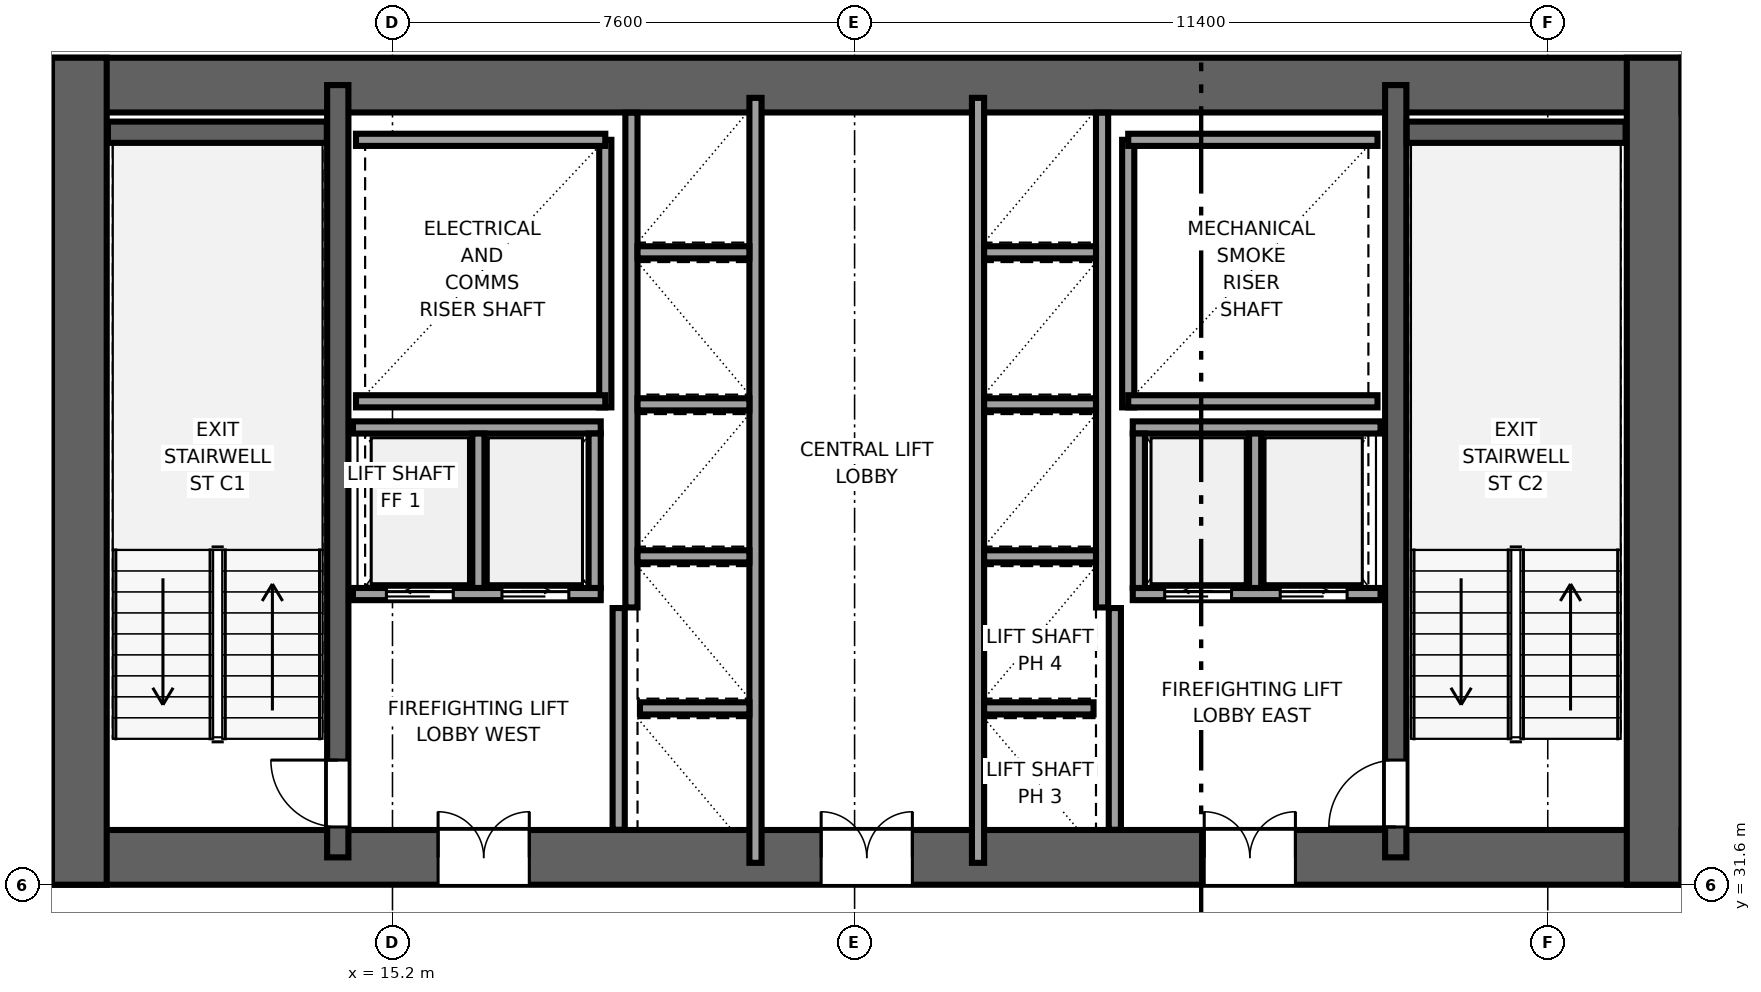
"""IFC4 building model, lengths in metres.
Left out: names, types, materials, properties, quantities, classifications, styles, units other than length and angle.
Written with IfcOpenShell. Run it as: python <this file> out.ifc"""

import sys

from ifc_helpers import new_model, si_unit, direction, frame, frame_2d, origin, place, context, subcontext, project, spatial, rectangle, extrude, source, transform, mapped, element, fill, save


model = new_model("IFC4")
c1 = context("Model", 3, precision=1e-05, world=origin(), true_north=direction((0.0, 1.0)))
c2 = subcontext(c1, "Body", "Model", "MODEL_VIEW")
j1 = project(units=[si_unit("LENGTHUNIT", "METRE"), si_unit("PLANEANGLEUNIT", "RADIAN")], contexts=[c1])
p1 = place(None, origin())
s1 = spatial("IfcSite", under=j1, at=p1, CompositionType="ELEMENT")
p2 = place(p1, origin())
s2 = spatial("IfcBuilding", under=s1, at=p2, CompositionType="ELEMENT")
p3 = place(p2, frame((0.0, 0.0, 63.95)))
s3 = spatial("IfcBuildingStorey", under=s2, at=p3, CompositionType="ELEMENT", Elevation=63.95)
p4 = place(p3, frame((9.6, 32.05, 0.0), z_axis=(0.0, 0.0, 1.0), x_axis=(1.0, 0.0, 0.0)))
e1 = element("IfcWall", 1, at=p4, inside=s3, PredefinedType="SHEAR", context=c2, shape_type="SweptSolid", body=[
    extrude(rectangle(XDim=26.8, YDim=0.9, at=frame_2d((13.4, 0.0))), origin(), (0.0, 0.0, 1.0), 3.55),
])
p5 = place(p4, frame((7.85, 0.0, 0.0), z_axis=(0.0, 0.0, 1.0), x_axis=(-1.0, 0.0, 0.0)))
e2 = element("IfcOpeningElement", 2, at=p5, cuts=e1, PredefinedType="OPENING", context=c2, shape_type="SweptSolid", body=[
    extrude(rectangle(XDim=1.5, YDim=2.04, at=frame_2d((0.75, 1.02))), frame((0.0, 0.46, 0.0), z_axis=(0.0, -1.0, 0.0), x_axis=(1.0, 0.0, 0.0)), (0.0, 0.0, 1.0), 0.92),
])
p6 = place(p4, frame((14.15, 0.0, 0.0), z_axis=(0.0, 0.0, 1.0), x_axis=(-1.0, 0.0, 0.0)))
e3 = element("IfcOpeningElement", 3, at=p6, cuts=e1, PredefinedType="OPENING", context=c2, shape_type="SweptSolid", body=[
    extrude(rectangle(XDim=1.5, YDim=2.04, at=frame_2d((0.75, 1.02))), frame((0.0, 0.46, 0.0), z_axis=(0.0, -1.0, 0.0), x_axis=(1.0, 0.0, 0.0)), (0.0, 0.0, 1.0), 0.92),
])
p7 = place(p4, frame((20.45, 0.0, 0.0), z_axis=(0.0, 0.0, 1.0), x_axis=(-1.0, 0.0, 0.0)))
e4 = element("IfcOpeningElement", 4, at=p7, cuts=e1, PredefinedType="OPENING", context=c2, shape_type="SweptSolid", body=[
    extrude(rectangle(XDim=1.5, YDim=2.04, at=frame_2d((0.75, 1.02))), frame((0.0, 0.46, 0.0), z_axis=(0.0, -1.0, 0.0), x_axis=(1.0, 0.0, 0.0)), (0.0, 0.0, 1.0), 0.92),
])
p8 = place(p3, frame((9.6, 44.75, 0.0), z_axis=(0.0, 0.0, 1.0), x_axis=(1.0, 0.0, 0.0)))
e5 = element("IfcWall", 5, at=p8, inside=s3, PredefinedType="SHEAR", context=c2, shape_type="SweptSolid", body=[
    extrude(rectangle(XDim=26.8, YDim=0.9, at=frame_2d((13.4, 0.0))), origin(), (0.0, 0.0, 1.0), 3.55),
])
for number, where, z_axis, x_axis in (
    (6, (10.05, 31.6, 0.0), (0.0, 0.0, 1.0), (0.0, 1.0, 0.0)),
    (7, (35.95, 31.6, 0.0), (0.0, 0.0, 1.0), (0.0, 1.0, 0.0)),
):
    element("IfcWall", number, at=place(p3, frame(where, z_axis=z_axis, x_axis=x_axis)), inside=s3, PredefinedType="SHEAR", context=c2, shape_type="SweptSolid", body=[
        extrude(rectangle(XDim=13.6, YDim=0.9, at=frame_2d((6.8, 0.0))), origin(), (0.0, 0.0, 1.0), 3.55),
    ])
p9 = place(p3, frame((14.3, 32.05, 0.0), z_axis=(0.0, 0.0, 1.0), x_axis=(0.0, 1.0, 0.0)))
e8 = element("IfcWall", 8, at=p9, inside=s3, PredefinedType="SHEAR", context=c2, shape_type="SweptSolid", body=[
    extrude(rectangle(XDim=12.7, YDim=0.35, at=frame_2d((6.35, 0.0))), origin(), (0.0, 0.0, 1.0), 3.55),
])
p10 = place(p9, frame((0.5, 0.0, 0.0)))
e9 = element("IfcOpeningElement", 9, at=p10, cuts=e8, PredefinedType="OPENING", context=c2, shape_type="SweptSolid", body=[
    extrude(rectangle(XDim=1.1, YDim=2.12, at=frame_2d((0.55, 1.06))), frame((0.0, 0.185, 0.0), z_axis=(0.0, -1.0, 0.0), x_axis=(1.0, 0.0, 0.0)), (0.0, 0.0, 1.0), 0.37),
])
p11 = place(p3, frame((31.7, 32.05, 0.0), z_axis=(0.0, 0.0, 1.0), x_axis=(0.0, 1.0, 0.0)))
e10 = element("IfcWall", 10, at=p11, inside=s3, PredefinedType="SHEAR", context=c2, shape_type="SweptSolid", body=[
    extrude(rectangle(XDim=12.7, YDim=0.35, at=frame_2d((6.35, 0.0))), origin(), (0.0, 0.0, 1.0), 3.55),
])
p12 = place(p11, frame((1.6, 0.0, 0.0), z_axis=(0.0, 0.0, 1.0), x_axis=(-1.0, 0.0, 0.0)))
e11 = element("IfcOpeningElement", 11, at=p12, cuts=e10, PredefinedType="OPENING", context=c2, shape_type="SweptSolid", body=[
    extrude(rectangle(XDim=1.1, YDim=2.12, at=frame_2d((0.55, 1.06))), frame((0.0, 0.185, 0.0), z_axis=(0.0, -1.0, 0.0), x_axis=(1.0, 0.0, 0.0)), (0.0, 0.0, 1.0), 0.37),
])
for number, where, z_axis, x_axis in (
    (12, (10.52, 43.975, 0.0), (0.0, 0.0, 1.0), (1.0, 0.0, 0.0)),
    (13, (31.88, 43.975, 0.0), (0.0, 0.0, 1.0), (1.0, 0.0, 0.0)),
):
    element("IfcWall", number, at=place(p3, frame(where, z_axis=z_axis, x_axis=x_axis)), inside=s3, PredefinedType="SHEAR", context=c2, shape_type="SweptSolid", body=[
        extrude(rectangle(XDim=3.6, YDim=0.35, at=frame_2d((1.8, 0.0))), origin(), (0.0, 0.0, 1.0), 3.55),
    ])
p13 = place(p3, frame((18.7, 39.45, 0.0), z_axis=(0.0, 0.0, 1.0), x_axis=(0.0, 1.0, 0.0)))
e14 = element("IfcWall", 14, at=p13, inside=s3, PredefinedType="SOLIDWALL", context=c2, shape_type="SweptSolid", body=[
    extrude(rectangle(XDim=4.4, YDim=0.2, at=frame_2d((2.2, 0.0))), origin(), (0.0, 0.0, 1.0), 3.37),
])
for number, where, z_axis, x_axis in (
    (15, (14.6, 39.55, 0.0), (0.0, 0.0, 1.0), (1.0, 0.0, 0.0)),
    (16, (14.6, 43.85, 0.0), (0.0, 0.0, 1.0), (1.0, 0.0, 0.0)),
):
    element("IfcWall", number, at=place(p3, frame(where, z_axis=z_axis, x_axis=x_axis)), inside=s3, PredefinedType="SOLIDWALL", context=c2, shape_type="SweptSolid", body=[
        extrude(rectangle(XDim=4.1, YDim=0.2, at=frame_2d((2.05, 0.0))), origin(), (0.0, 0.0, 1.0), 3.37),
    ])
p14 = place(p3, frame((27.3, 39.45, 0.0), z_axis=(0.0, 0.0, 1.0), x_axis=(0.0, 1.0, 0.0)))
e17 = element("IfcWall", 17, at=p14, inside=s3, PredefinedType="SOLIDWALL", context=c2, shape_type="SweptSolid", body=[
    extrude(rectangle(XDim=4.4, YDim=0.2, at=frame_2d((2.2, 0.0))), origin(), (0.0, 0.0, 1.0), 3.37),
])
for number, where, z_axis, x_axis in (
    (18, (27.3, 39.55, 0.0), (0.0, 0.0, 1.0), (1.0, 0.0, 0.0)),
    (19, (27.3, 43.85, 0.0), (0.0, 0.0, 1.0), (1.0, 0.0, 0.0)),
):
    element("IfcWall", number, at=place(p3, frame(where, z_axis=z_axis, x_axis=x_axis)), inside=s3, PredefinedType="SOLIDWALL", context=c2, shape_type="SweptSolid", body=[
        extrude(rectangle(XDim=4.1, YDim=0.2, at=frame_2d((2.05, 0.0))), origin(), (0.0, 0.0, 1.0), 3.37),
    ])
for number, where, z_axis, x_axis in (
    (20, (18.92, 32.504, 0.0), (0.0, 0.0, 1.0), (0.0, 1.0, 0.0)),
    (21, (27.08, 32.504, 0.0), (0.0, 0.0, 1.0), (0.0, 1.0, 0.0)),
):
    element("IfcWall", number, at=place(p3, frame(where, z_axis=z_axis, x_axis=x_axis)), inside=s3, PredefinedType="SOLIDWALL", context=c2, shape_type="SweptSolid", body=[
        extrude(rectangle(XDim=3.646, YDim=0.2, at=frame_2d((1.823, 0.0))), origin(), (0.0, 0.0, 1.0), 3.37),
    ])
p15 = place(p3, frame((21.17, 31.96, 0.0), z_axis=(0.0, 0.0, 1.0), x_axis=(0.0, 1.0, 0.0)))
e22 = element("IfcWall", 22, at=p15, inside=s3, PredefinedType="SOLIDWALL", context=c2, shape_type="SweptSolid", body=[
    extrude(rectangle(XDim=12.58, YDim=0.2, at=frame_2d((6.29, 0.0))), origin(), (0.0, 0.0, 1.0), 3.37),
])
p16 = place(p3, frame((19.13, 36.16, 0.0), z_axis=(0.0, 0.0, 1.0), x_axis=(0.0, 1.0, 0.0)))
e23 = element("IfcWall", 23, at=p16, inside=s3, PredefinedType="SOLIDWALL", context=c2, shape_type="SweptSolid", body=[
    extrude(rectangle(XDim=8.136, YDim=0.2, at=frame_2d((4.068, 0.0))), origin(), (0.0, 0.0, 1.0), 3.37),
])
p17 = place(p3, frame((19.27, 34.5, 0.0), z_axis=(0.0, 0.0, 1.0), x_axis=(1.0, 0.0, 0.0)))
e24 = element("IfcWall", 24, at=p17, inside=s3, PredefinedType="SOLIDWALL", context=c2, shape_type="SweptSolid", body=[
    extrude(rectangle(XDim=1.8, YDim=0.2, at=frame_2d((0.9, 0.0))), origin(), (0.0, 0.0, 1.0), 3.37),
])
for number, where, z_axis, x_axis in (
    (25, (19.23, 37.0, 0.0), (0.0, 0.0, 1.0), (1.0, 0.0, 0.0)),
    (26, (19.23, 39.5, 0.0), (0.0, 0.0, 1.0), (1.0, 0.0, 0.0)),
    (27, (19.23, 42.0, 0.0), (0.0, 0.0, 1.0), (1.0, 0.0, 0.0)),
):
    element("IfcWall", number, at=place(p3, frame(where, z_axis=z_axis, x_axis=x_axis)), inside=s3, PredefinedType="SOLIDWALL", context=c2, shape_type="SweptSolid", body=[
        extrude(rectangle(XDim=1.84, YDim=0.2, at=frame_2d((0.92, 0.0))), origin(), (0.0, 0.0, 1.0), 3.37),
    ])
p18 = place(p3, frame((27.375, 36.38, 0.0), z_axis=(0.0, 0.0, 1.0), x_axis=(1.0, 0.0, 0.0)))
e28 = element("IfcWall", 28, at=p18, inside=s3, PredefinedType="SOLIDWALL", context=c2, shape_type="SweptSolid", body=[
    extrude(rectangle(XDim=4.075, YDim=0.2, at=frame_2d((2.038, 0.0))), origin(), (0.0, 0.0, 1.0), 3.37),
])
p19 = place(p18, frame((0.525, 0.0, 0.0)))
e29 = element("IfcOpeningElement", 29, at=p19, cuts=e28, PredefinedType="OPENING", context=c2, shape_type="SweptSolid", body=[
    extrude(rectangle(XDim=1.1, YDim=2.12, at=frame_2d((0.55, 1.06))), frame((0.0, 0.11, 0.0), z_axis=(0.0, -1.0, 0.0), x_axis=(1.0, 0.0, 0.0)), (0.0, 0.0, 1.0), 0.22),
])
p20 = place(p18, frame((2.425, 0.0, 0.0)))
e30 = element("IfcOpeningElement", 30, at=p20, cuts=e28, PredefinedType="OPENING", context=c2, shape_type="SweptSolid", body=[
    extrude(rectangle(XDim=1.1, YDim=2.12, at=frame_2d((0.55, 1.06))), frame((0.0, 0.11, 0.0), z_axis=(0.0, -1.0, 0.0), x_axis=(1.0, 0.0, 0.0)), (0.0, 0.0, 1.0), 0.22),
])
p21 = place(p3, frame((27.375, 39.12, 0.0), z_axis=(0.0, 0.0, 1.0), x_axis=(1.0, 0.0, 0.0)))
e31 = element("IfcWall", 31, at=p21, inside=s3, PredefinedType="SOLIDWALL", context=c2, shape_type="SweptSolid", body=[
    extrude(rectangle(XDim=4.075, YDim=0.2, at=frame_2d((2.038, 0.0))), origin(), (0.0, 0.0, 1.0), 3.37),
])
for number, where, z_axis, x_axis in (
    (32, (27.475, 36.48, 0.0), (0.0, 0.0, 1.0), (0.0, 1.0, 0.0)),
    (33, (29.387, 36.48, 0.0), (0.0, 0.0, 1.0), (0.0, 1.0, 0.0)),
):
    element("IfcWall", number, at=place(p3, frame(where, z_axis=z_axis, x_axis=x_axis)), inside=s3, PredefinedType="SOLIDWALL", context=c2, shape_type="SweptSolid", body=[
        extrude(rectangle(XDim=2.54, YDim=0.2, at=frame_2d((1.27, 0.0))), origin(), (0.0, 0.0, 1.0), 3.37),
    ])
p22 = place(p3, frame((14.55, 36.38, 0.0), z_axis=(0.0, 0.0, 1.0), x_axis=(1.0, 0.0, 0.0)))
e34 = element("IfcWall", 34, at=p22, inside=s3, PredefinedType="SOLIDWALL", context=c2, shape_type="SweptSolid", body=[
    extrude(rectangle(XDim=4.075, YDim=0.2, at=frame_2d((2.038, 0.0))), origin(), (0.0, 0.0, 1.0), 3.37),
])
p23 = place(p22, frame((0.55, 0.0, 0.0)))
e35 = element("IfcOpeningElement", 35, at=p23, cuts=e34, PredefinedType="OPENING", context=c2, shape_type="SweptSolid", body=[
    extrude(rectangle(XDim=1.1, YDim=2.12, at=frame_2d((0.55, 1.06))), frame((0.0, 0.11, 0.0), z_axis=(0.0, -1.0, 0.0), x_axis=(1.0, 0.0, 0.0)), (0.0, 0.0, 1.0), 0.22),
])
p24 = place(p22, frame((2.45, 0.0, 0.0)))
e36 = element("IfcOpeningElement", 36, at=p24, cuts=e34, PredefinedType="OPENING", context=c2, shape_type="SweptSolid", body=[
    extrude(rectangle(XDim=1.1, YDim=2.12, at=frame_2d((0.55, 1.06))), frame((0.0, 0.11, 0.0), z_axis=(0.0, -1.0, 0.0), x_axis=(1.0, 0.0, 0.0)), (0.0, 0.0, 1.0), 0.22),
])
p25 = place(p3, frame((14.55, 39.12, 0.0), z_axis=(0.0, 0.0, 1.0), x_axis=(1.0, 0.0, 0.0)))
e37 = element("IfcWall", 37, at=p25, inside=s3, PredefinedType="SOLIDWALL", context=c2, shape_type="SweptSolid", body=[
    extrude(rectangle(XDim=4.075, YDim=0.2, at=frame_2d((2.038, 0.0))), origin(), (0.0, 0.0, 1.0), 3.37),
])
for number, where, z_axis, x_axis in (
    (38, (18.525, 36.48, 0.0), (0.0, 0.0, 1.0), (0.0, 1.0, 0.0)),
    (39, (16.613, 36.48, 0.0), (0.0, 0.0, 1.0), (0.0, 1.0, 0.0)),
):
    element("IfcWall", number, at=place(p3, frame(where, z_axis=z_axis, x_axis=x_axis)), inside=s3, PredefinedType="SOLIDWALL", context=c2, shape_type="SweptSolid", body=[
        extrude(rectangle(XDim=2.54, YDim=0.2, at=frame_2d((1.27, 0.0))), origin(), (0.0, 0.0, 1.0), 3.37),
    ])
p26 = place(p3, frame((24.83, 31.96, 0.0), z_axis=(0.0, 0.0, 1.0), x_axis=(0.0, 1.0, 0.0)))
e40 = element("IfcWall", 40, at=p26, inside=s3, PredefinedType="SOLIDWALL", context=c2, shape_type="SweptSolid", body=[
    extrude(rectangle(XDim=12.58, YDim=0.2, at=frame_2d((6.29, 0.0))), origin(), (0.0, 0.0, 1.0), 3.37),
])
p27 = place(p3, frame((26.87, 36.16, 0.0), z_axis=(0.0, 0.0, 1.0), x_axis=(0.0, 1.0, 0.0)))
e41 = element("IfcWall", 41, at=p27, inside=s3, PredefinedType="SOLIDWALL", context=c2, shape_type="SweptSolid", body=[
    extrude(rectangle(XDim=8.136, YDim=0.2, at=frame_2d((4.068, 0.0))), origin(), (0.0, 0.0, 1.0), 3.37),
])
p28 = place(p3, frame((24.93, 34.5, 0.0), z_axis=(0.0, 0.0, 1.0), x_axis=(1.0, 0.0, 0.0)))
e42 = element("IfcWall", 42, at=p28, inside=s3, PredefinedType="SOLIDWALL", context=c2, shape_type="SweptSolid", body=[
    extrude(rectangle(XDim=1.8, YDim=0.2, at=frame_2d((0.9, 0.0))), origin(), (0.0, 0.0, 1.0), 3.37),
])
for number, where, z_axis, x_axis in (
    (43, (24.93, 37.0, 0.0), (0.0, 0.0, 1.0), (1.0, 0.0, 0.0)),
    (44, (24.93, 39.5, 0.0), (0.0, 0.0, 1.0), (1.0, 0.0, 0.0)),
    (45, (24.93, 42.0, 0.0), (0.0, 0.0, 1.0), (1.0, 0.0, 0.0)),
):
    element("IfcWall", number, at=place(p3, frame(where, z_axis=z_axis, x_axis=x_axis)), inside=s3, PredefinedType="SOLIDWALL", context=c2, shape_type="SweptSolid", body=[
        extrude(rectangle(XDim=1.84, YDim=0.2, at=frame_2d((0.92, 0.0))), origin(), (0.0, 0.0, 1.0), 3.37),
    ])
m1 = source(origin(), c2, "Body", "SweptSolid", [
    extrude(rectangle(XDim=1.1, YDim=2.12, at=frame_2d((0.55, 1.06))), frame((0.0, 0.025, 0.0), z_axis=(0.0, -1.0, 0.0), x_axis=(1.0, 0.0, 0.0)), (0.0, 0.0, 1.0), 0.05),
])
p29 = place(p10, origin())
e46 = element("IfcDoor", 46, at=p29, inside=s3, OperationType="SINGLE_SWING_RIGHT", PredefinedType="DOOR", context=c2, shape_type="MappedRepresentation", body=[
    mapped(m1, transform((0.0, 0.0, 0.0), x_axis=(1.0, 0.0, 0.0), y_axis=(0.0, 1.0, 0.0), z_axis=(0.0, 0.0, 1.0), scale=1.0)),
])
fill(e9, e46)
p30 = place(p12, origin())
e47 = element("IfcDoor", 47, at=p30, inside=s3, OperationType="SINGLE_SWING_LEFT", PredefinedType="DOOR", context=c2, shape_type="MappedRepresentation", body=[
    mapped(m1, transform((0.0, 0.0, 0.0), x_axis=(1.0, 0.0, 0.0), y_axis=(0.0, 1.0, 0.0), z_axis=(0.0, 0.0, 1.0), scale=1.0)),
])
fill(e11, e47)
m2 = source(origin(), c2, "Body", "SweptSolid", [
    extrude(rectangle(XDim=1.5, YDim=2.04, at=frame_2d((0.75, 1.02))), frame((0.0, 0.025, 0.0), z_axis=(0.0, -1.0, 0.0), x_axis=(1.0, 0.0, 0.0)), (0.0, 0.0, 1.0), 0.05),
])
p31 = place(p5, origin())
e48 = element("IfcDoor", 48, at=p31, inside=s3, OperationType="DOUBLE_DOOR_SINGLE_SWING", PredefinedType="DOOR", context=c2, shape_type="MappedRepresentation", body=[
    mapped(m2, transform((0.0, 0.0, 0.0), x_axis=(1.0, 0.0, 0.0), y_axis=(0.0, 1.0, 0.0), z_axis=(0.0, 0.0, 1.0), scale=1.0)),
])
fill(e2, e48)
p32 = place(p6, origin())
e49 = element("IfcDoor", 49, at=p32, inside=s3, OperationType="DOUBLE_DOOR_SINGLE_SWING", PredefinedType="DOOR", context=c2, shape_type="MappedRepresentation", body=[
    mapped(m2, transform((0.0, 0.0, 0.0), x_axis=(1.0, 0.0, 0.0), y_axis=(0.0, 1.0, 0.0), z_axis=(0.0, 0.0, 1.0), scale=1.0)),
])
fill(e3, e49)
p33 = place(p7, origin())
e50 = element("IfcDoor", 50, at=p33, inside=s3, OperationType="DOUBLE_DOOR_SINGLE_SWING", PredefinedType="DOOR", context=c2, shape_type="MappedRepresentation", body=[
    mapped(m2, transform((0.0, 0.0, 0.0), x_axis=(1.0, 0.0, 0.0), y_axis=(0.0, 1.0, 0.0), z_axis=(0.0, 0.0, 1.0), scale=1.0)),
])
fill(e4, e50)
m3 = source(origin(), c2, "Body", "SweptSolid", [
    extrude(rectangle(XDim=1.1, YDim=2.12, at=frame_2d((0.55, 1.06))), frame((0.0, 0.025, 0.0), z_axis=(0.0, -1.0, 0.0), x_axis=(1.0, 0.0, 0.0)), (0.0, 0.0, 1.0), 0.05),
])
p34 = place(p19, origin())
e51 = element("IfcDoor", 51, at=p34, inside=s3, OperationType="SLIDING_TO_LEFT", PredefinedType="DOOR", context=c2, shape_type="MappedRepresentation", body=[
    mapped(m3, transform((0.0, 0.0, 0.0), x_axis=(1.0, 0.0, 0.0), y_axis=(0.0, 1.0, 0.0), z_axis=(0.0, 0.0, 1.0), scale=1.0)),
])
fill(e29, e51)
p35 = place(p20, origin())
e52 = element("IfcDoor", 52, at=p35, inside=s3, OperationType="SLIDING_TO_RIGHT", PredefinedType="DOOR", context=c2, shape_type="MappedRepresentation", body=[
    mapped(m3, transform((0.0, 0.0, 0.0), x_axis=(1.0, 0.0, 0.0), y_axis=(0.0, 1.0, 0.0), z_axis=(0.0, 0.0, 1.0), scale=1.0)),
])
fill(e30, e52)
p36 = place(p23, origin())
e53 = element("IfcDoor", 53, at=p36, inside=s3, OperationType="SLIDING_TO_LEFT", PredefinedType="DOOR", context=c2, shape_type="MappedRepresentation", body=[
    mapped(m3, transform((0.0, 0.0, 0.0), x_axis=(1.0, 0.0, 0.0), y_axis=(0.0, 1.0, 0.0), z_axis=(0.0, 0.0, 1.0), scale=1.0)),
])
fill(e35, e53)
p37 = place(p24, origin())
e54 = element("IfcDoor", 54, at=p37, inside=s3, OperationType="SLIDING_TO_RIGHT", PredefinedType="DOOR", context=c2, shape_type="MappedRepresentation", body=[
    mapped(m3, transform((0.0, 0.0, 0.0), x_axis=(1.0, 0.0, 0.0), y_axis=(0.0, 1.0, 0.0), z_axis=(0.0, 0.0, 1.0), scale=1.0)),
])
fill(e36, e54)
save(model, sys.argv[1])
